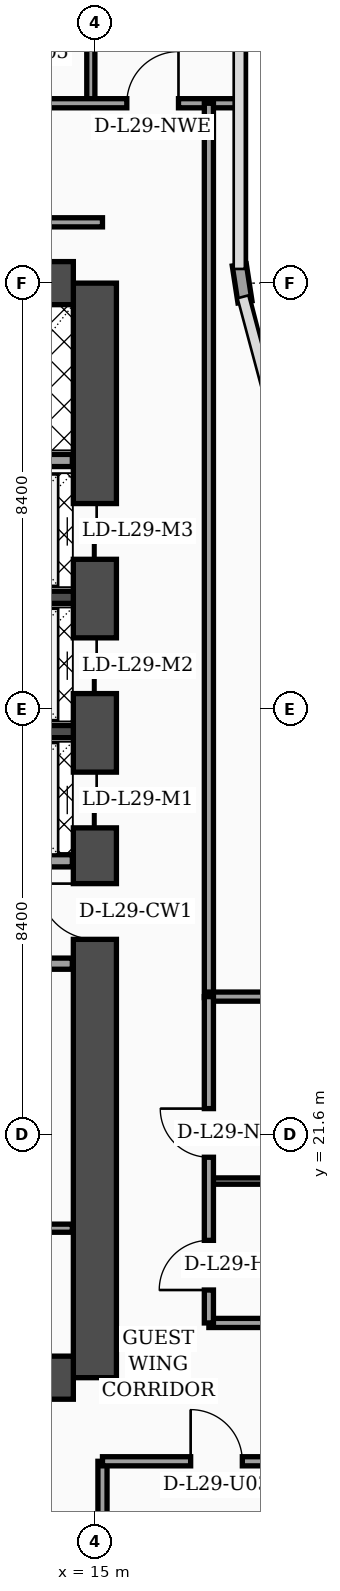
"""IFC4 building model, lengths in metres.
Left out: names, types, materials, properties, quantities, classifications, styles, units other than length and angle.
Written with IfcOpenShell. Run it as: python <this file> out.ifc"""

import sys

from ifc_helpers import new_model, si_unit, direction, frame, frame_2d, origin, place, context, subcontext, project, spatial, rectangle, extrude, element, fill, save


model = new_model("IFC4")
c1 = context("Model", 3, precision=1e-05, world=origin(), true_north=direction((0.0, 1.0)))
c2 = subcontext(c1, "Body", "Model", "MODEL_VIEW")
j1 = project(units=[si_unit("LENGTHUNIT", "METRE"), si_unit("PLANEANGLEUNIT", "RADIAN")], contexts=[c1])
p1 = place(None, origin())
s1 = spatial("IfcSite", under=j1, at=p1, CompositionType="ELEMENT")
p2 = place(p1, origin())
s2 = spatial("IfcBuilding", under=s1, at=p2, CompositionType="ELEMENT")
p3 = place(p2, frame((0.0, 0.0, 120.2)))
s3 = spatial("IfcBuildingStorey", under=s2, at=p3, CompositionType="ELEMENT", Elevation=120.2)
p4 = place(p3, frame((15.0, 16.8, 0.0), z_axis=(0.0, 0.0, 1.0), x_axis=(0.0, 1.0, 0.0)))
e1 = element("IfcWall", 1, at=p4, inside=s3, PredefinedType="SHEAR", context=c2, shape_type="SweptSolid", body=[
    extrude(rectangle(XDim=21.6, YDim=0.85, at=frame_2d((10.8, 0.0))), origin(), (0.0, 0.0, 1.0), 3.56),
])
p5 = place(p4, frame((8.65, 0.0, 0.0)))
e2 = element("IfcOpeningElement", 2, at=p5, cuts=e1, PredefinedType="OPENING", context=c2, shape_type="SweptSolid", body=[
    extrude(rectangle(XDim=1.1, YDim=2.2, at=frame_2d((0.55, 1.1))), frame((0.0, 0.435, 0.0), z_axis=(0.0, -1.0, 0.0), x_axis=(1.0, 0.0, 0.0)), (0.0, 0.0, 1.0), 0.87),
])
p6 = place(p4, frame((10.85, 0.0, 0.0)))
e3 = element("IfcOpeningElement", 3, at=p6, cuts=e1, PredefinedType="OPENING", context=c2, shape_type="SweptSolid", body=[
    extrude(rectangle(XDim=1.1, YDim=2.2, at=frame_2d((0.55, 1.1))), frame((0.0, 0.435, 0.0), z_axis=(0.0, -1.0, 0.0), x_axis=(1.0, 0.0, 0.0)), (0.0, 0.0, 1.0), 0.87),
])
p7 = place(p4, frame((13.5, 0.0, 0.0)))
e4 = element("IfcOpeningElement", 4, at=p7, cuts=e1, PredefinedType="OPENING", context=c2, shape_type="SweptSolid", body=[
    extrude(rectangle(XDim=1.1, YDim=2.2, at=frame_2d((0.55, 1.1))), frame((0.0, 0.435, 0.0), z_axis=(0.0, -1.0, 0.0), x_axis=(1.0, 0.0, 0.0)), (0.0, 0.0, 1.0), 0.87),
])
p8 = place(p4, frame((16.15, 0.0, 0.0)))
e5 = element("IfcOpeningElement", 5, at=p8, cuts=e1, PredefinedType="OPENING", context=c2, shape_type="SweptSolid", body=[
    extrude(rectangle(XDim=1.1, YDim=2.2, at=frame_2d((0.55, 1.1))), frame((0.0, 0.435, 0.0), z_axis=(0.0, -1.0, 0.0), x_axis=(1.0, 0.0, 0.0)), (0.0, 0.0, 1.0), 0.87),
])
for number, where, z_axis, x_axis in (
    (6, (4.625, 38.4, 0.0), (0.0, 0.0, 1.0), (1.0, 0.0, 0.0)),
    (7, (4.625, 16.8, 0.0), (0.0, 0.0, 1.0), (1.0, 0.0, 0.0)),
):
    element("IfcWall", number, at=place(p3, frame(where, z_axis=z_axis, x_axis=x_axis)), inside=s3, PredefinedType="SHEAR", context=c2, shape_type="SweptSolid", body=[
        extrude(rectangle(XDim=9.95, YDim=0.85, at=frame_2d((4.975, 0.0))), origin(), (0.0, 0.0, 1.0), 3.56),
    ])
for number, where, z_axis, x_axis in (
    (8, (12.18, 29.55, 0.0), (0.0, 0.0, 1.0), (1.0, 0.0, 0.0)),
    (9, (12.18, 32.2, 0.0), (0.0, 0.0, 1.0), (1.0, 0.0, 0.0)),
):
    element("IfcWall", number, at=place(p3, frame(where, z_axis=z_axis, x_axis=x_axis)), inside=s3, PredefinedType="SOLIDWALL", context=c2, shape_type="SweptSolid", body=[
        extrude(rectangle(XDim=2.395, YDim=0.24, at=frame_2d((1.198, 0.0))), origin(), (0.0, 0.0, 1.0), 3.56),
    ])
p9 = place(p3, frame((17.962, 38.03, 0.0), z_axis=(0.0, 0.0, 1.0), x_axis=(-0.15141125477, 0.988470855377, 0.0)))
e10 = element("IfcWall", 10, at=p9, inside=s3, PredefinedType="SOLIDWALL", context=c2, shape_type="SweptSolid", body=[
    extrude(rectangle(XDim=0.739, YDim=0.28, at=frame_2d((0.369, 0.0))), origin(), (0.0, 0.0, 1.0), 3.56),
])
p10 = place(p3, frame((9.68, 19.75, 0.0), z_axis=(0.0, 0.0, 1.0), x_axis=(1.0, 0.0, 0.0)))
e11 = element("IfcWall", 11, at=p10, inside=s3, PredefinedType="PARTITIONING", context=c2, shape_type="SweptSolid", body=[
    extrude(rectangle(XDim=4.875, YDim=0.16, at=frame_2d((2.438, 0.0))), origin(), (0.0, 0.0, 1.0), 3.56),
])
p11 = place(p10, frame((1.1, 0.0, 0.0)))
e12 = element("IfcOpeningElement", 12, at=p11, cuts=e11, PredefinedType="OPENING", context=c2, shape_type="SweptSolid", body=[
    extrude(rectangle(XDim=0.98, YDim=2.15, at=frame_2d((0.49, 1.075))), frame((0.0, 0.09, 0.0), z_axis=(0.0, -1.0, 0.0), x_axis=(1.0, 0.0, 0.0)), (0.0, 0.0, 1.0), 0.18),
])
p12 = place(p3, frame((9.68, 24.97, 0.0), z_axis=(0.0, 0.0, 1.0), x_axis=(1.0, 0.0, 0.0)))
e13 = element("IfcWall", 13, at=p12, inside=s3, PredefinedType="SOLIDWALL", context=c2, shape_type="SweptSolid", body=[
    extrude(rectangle(XDim=4.875, YDim=0.22, at=frame_2d((2.438, 0.0))), origin(), (0.0, 0.0, 1.0), 2.84),
])
p13 = place(p12, frame((0.9, 0.0, 0.0)))
e14 = element("IfcOpeningElement", 14, at=p13, cuts=e13, PredefinedType="OPENING", context=c2, shape_type="SweptSolid", body=[
    extrude(rectangle(XDim=0.98, YDim=2.15, at=frame_2d((0.49, 1.075))), frame((0.0, 0.12, 0.0), z_axis=(0.0, -1.0, 0.0), x_axis=(1.0, 0.0, 0.0)), (0.0, 0.0, 1.0), 0.24),
])
p14 = place(p3, frame((12.25, 27.0, 0.0), z_axis=(0.0, 0.0, 1.0), x_axis=(1.0, 0.0, 0.0)))
e15 = element("IfcWall", 15, at=p14, inside=s3, PredefinedType="SOLIDWALL", context=c2, shape_type="SweptSolid", body=[
    extrude(rectangle(XDim=2.305, YDim=0.24, at=frame_2d((1.152, 0.0))), origin(), (0.0, 0.0, 1.0), 3.56),
])
p15 = place(p3, frame((9.66, 34.9, 0.0), z_axis=(0.0, 0.0, 1.0), x_axis=(1.0, 0.0, 0.0)))
e16 = element("IfcWall", 16, at=p15, inside=s3, PredefinedType="SOLIDWALL", context=c2, shape_type="SweptSolid", body=[
    extrude(rectangle(XDim=4.895, YDim=0.24, at=frame_2d((2.448, 0.0))), origin(), (0.0, 0.0, 1.0), 3.56),
])
p16 = place(p3, frame((15.15, 2.44, 0.0), z_axis=(0.0, 0.0, 1.0), x_axis=(0.0, 1.0, 0.0)))
e17 = element("IfcWall", 17, at=p16, inside=s3, PredefinedType="PARTITIONING", context=c2, shape_type="SweptSolid", body=[
    extrude(rectangle(XDim=12.71, YDim=0.18, at=frame_2d((6.355, 0.0))), origin(), (0.0, 0.0, 1.0), 3.04),
])
p17 = place(p3, frame((15.15, 15.15, 0.0), z_axis=(0.0, 0.0, 1.0), x_axis=(1.0, 0.0, 0.0)))
e18 = element("IfcWall", 18, at=p17, inside=s3, PredefinedType="PARTITIONING", context=c2, shape_type="SweptSolid", body=[
    extrude(rectangle(XDim=6.45, YDim=0.18, at=frame_2d((3.225, 0.0))), origin(), (0.0, 0.0, 1.0), 2.49),
])
p18 = place(p17, frame((1.74, 0.0, 0.0)))
e19 = element("IfcOpeningElement", 19, at=p18, cuts=e18, PredefinedType="OPENING", context=c2, shape_type="SweptSolid", body=[
    extrude(rectangle(XDim=1.02, YDim=2.2, at=frame_2d((0.51, 1.1))), frame((0.0, 0.1, 0.0), z_axis=(0.0, -1.0, 0.0), x_axis=(1.0, 0.0, 0.0)), (0.0, 0.0, 1.0), 0.2),
])
p19 = place(p3, frame((14.92, 41.95, 0.0), z_axis=(0.0, 0.0, 1.0), x_axis=(0.0, 1.0, 0.0)))
e20 = element("IfcWall", 20, at=p19, inside=s3, PredefinedType="PARTITIONING", context=c2, shape_type="SweptSolid", body=[
    extrude(rectangle(XDim=5.85, YDim=0.16, at=frame_2d((2.925, 0.0))), origin(), (0.0, 0.0, 1.0), 3.04),
])
p20 = place(p3, frame((0.08, 41.95, 0.0), z_axis=(0.0, 0.0, 1.0), x_axis=(1.0, 0.0, 0.0)))
e21 = element("IfcWall", 21, at=p20, inside=s3, PredefinedType="PARTITIONING", context=c2, shape_type="SweptSolid", body=[
    extrude(rectangle(XDim=17.77, YDim=0.18, at=frame_2d((8.885, 0.0))), origin(), (0.0, 0.0, 1.0), 2.84),
])
p21 = place(p20, frame((0.9, 0.0, 0.0)))
e22 = element("IfcOpeningElement", 22, at=p21, cuts=e21, PredefinedType="OPENING", context=c2, shape_type="SweptSolid", body=[
    extrude(rectangle(XDim=1.02, YDim=2.2, at=frame_2d((0.51, 1.1))), frame((0.0, 0.1, 0.0), z_axis=(0.0, -1.0, 0.0), x_axis=(1.0, 0.0, 0.0)), (0.0, 0.0, 1.0), 0.2),
])
p22 = place(p20, frame((4.75, 0.0, 0.0)))
e23 = element("IfcOpeningElement", 23, at=p22, cuts=e21, PredefinedType="OPENING", context=c2, shape_type="SweptSolid", body=[
    extrude(rectangle(XDim=1.02, YDim=2.2, at=frame_2d((0.51, 1.1))), frame((0.0, 0.1, 0.0), z_axis=(0.0, -1.0, 0.0), x_axis=(1.0, 0.0, 0.0)), (0.0, 0.0, 1.0), 0.2),
])
p23 = place(p20, frame((10.63, 0.0, 0.0)))
e24 = element("IfcOpeningElement", 24, at=p23, cuts=e21, PredefinedType="OPENING", context=c2, shape_type="SweptSolid", body=[
    extrude(rectangle(XDim=1.02, YDim=2.2, at=frame_2d((0.51, 1.1))), frame((0.0, 0.1, 0.0), z_axis=(0.0, -1.0, 0.0), x_axis=(1.0, 0.0, 0.0)), (0.0, 0.0, 1.0), 0.2),
])
p24 = place(p20, frame((15.55, 0.0, 0.0)))
e25 = element("IfcOpeningElement", 25, at=p24, cuts=e21, PredefinedType="OPENING", context=c2, shape_type="SweptSolid", body=[
    extrude(rectangle(XDim=1.02, YDim=2.2, at=frame_2d((0.51, 1.1))), frame((0.0, 0.1, 0.0), z_axis=(0.0, -1.0, 0.0), x_axis=(1.0, 0.0, 0.0)), (0.0, 0.0, 1.0), 0.2),
])
p25 = place(p3, frame((17.25, 24.3, 0.0), z_axis=(0.0, 0.0, 1.0), x_axis=(0.0, 1.0, 0.0)))
e26 = element("IfcWall", 26, at=p25, inside=s3, PredefinedType="PARTITIONING", context=c2, shape_type="SweptSolid", body=[
    extrude(rectangle(XDim=17.65, YDim=0.18, at=frame_2d((8.825, 0.0))), origin(), (0.0, 0.0, 1.0), 2.84),
])
p26 = place(p3, frame((3.755, 39.6, 0.0), z_axis=(0.0, 0.0, 1.0), x_axis=(1.0, 0.0, 0.0)))
e27 = element("IfcWall", 27, at=p26, inside=s3, PredefinedType="PARTITIONING", context=c2, shape_type="SweptSolid", body=[
    extrude(rectangle(XDim=11.395, YDim=0.18, at=frame_2d((5.698, 0.0))), origin(), (0.0, 0.0, 1.0), 2.84),
])
p27 = place(p3, frame((17.25, 17.88, 0.0), z_axis=(0.0, 0.0, 1.0), x_axis=(1.0, 0.0, 0.0)))
e28 = element("IfcWall", 28, at=p27, inside=s3, PredefinedType="PARTITIONING", context=c2, shape_type="SweptSolid", body=[
    extrude(rectangle(XDim=4.3, YDim=0.18, at=frame_2d((2.15, 0.0))), origin(), (0.0, 0.0, 1.0), 3.56),
])
p28 = place(p3, frame((17.25, 20.68, 0.0), z_axis=(0.0, 0.0, 1.0), x_axis=(1.0, 0.0, 0.0)))
e29 = element("IfcWall", 29, at=p28, inside=s3, PredefinedType="PARTITIONING", context=c2, shape_type="SweptSolid", body=[
    extrude(rectangle(XDim=4.3, YDim=0.125, at=frame_2d((2.15, 0.0))), origin(), (0.0, 0.0, 1.0), 3.56),
])
p29 = place(p3, frame((17.25, 24.32, 0.0), z_axis=(0.0, 0.0, 1.0), x_axis=(1.0, 0.0, 0.0)))
e30 = element("IfcWall", 30, at=p29, inside=s3, PredefinedType="PARTITIONING", context=c2, shape_type="SweptSolid", body=[
    extrude(rectangle(XDim=4.35, YDim=0.18, at=frame_2d((2.175, 0.0))), origin(), (0.0, 0.0, 1.0), 3.56),
])
p30 = place(p3, frame((17.25, 17.88, 0.0), z_axis=(0.0, 0.0, 1.0), x_axis=(0.0, 1.0, 0.0)))
e31 = element("IfcWall", 31, at=p30, inside=s3, PredefinedType="PARTITIONING", context=c2, shape_type="SweptSolid", body=[
    extrude(rectangle(XDim=6.44, YDim=0.18, at=frame_2d((3.22, 0.0))), origin(), (0.0, 0.0, 1.0), 3.56),
])
p31 = place(p30, frame((0.65, 0.0, 0.0)))
e32 = element("IfcOpeningElement", 32, at=p31, cuts=e31, PredefinedType="OPENING", context=c2, shape_type="SweptSolid", body=[
    extrude(rectangle(XDim=0.98, YDim=2.15, at=frame_2d((0.49, 1.075))), frame((0.0, 0.1, 0.0), z_axis=(0.0, -1.0, 0.0), x_axis=(1.0, 0.0, 0.0)), (0.0, 0.0, 1.0), 0.2),
])
p32 = place(p30, frame((3.27, 0.0, 0.0)))
e33 = element("IfcOpeningElement", 33, at=p32, cuts=e31, PredefinedType="OPENING", context=c2, shape_type="SweptSolid", body=[
    extrude(rectangle(XDim=0.96, YDim=2.2, at=frame_2d((0.48, 1.1))), frame((0.0, 0.1, 0.0), z_axis=(0.0, -1.0, 0.0), x_axis=(1.0, 0.0, 0.0)), (0.0, 0.0, 1.0), 0.2),
])
p33 = place(p18, origin())
e34 = element("IfcDoor", 34, at=p33, inside=s3, OperationType="SINGLE_SWING_LEFT", PredefinedType="DOOR", context=c2, shape_type="SweptSolid", body=[
    extrude(rectangle(XDim=1.02, YDim=2.2, at=frame_2d((0.51, 1.1))), frame((0.0, 0.025, 0.0), z_axis=(0.0, -1.0, 0.0), x_axis=(1.0, 0.0, 0.0)), (0.0, 0.0, 1.0), 0.05),
])
fill(e19, e34)
p34 = place(p24, origin())
e35 = element("IfcDoor", 35, at=p34, inside=s3, OperationType="SINGLE_SWING_RIGHT", PredefinedType="DOOR", context=c2, shape_type="SweptSolid", body=[
    extrude(rectangle(XDim=1.02, YDim=2.2, at=frame_2d((0.51, 1.1))), frame((0.0, 0.025, 0.0), z_axis=(0.0, -1.0, 0.0), x_axis=(1.0, 0.0, 0.0)), (0.0, 0.0, 1.0), 0.05),
])
fill(e25, e35)
p35 = place(p31, origin())
e36 = element("IfcDoor", 36, at=p35, inside=s3, OperationType="SINGLE_SWING_LEFT", PredefinedType="DOOR", context=c2, shape_type="SweptSolid", body=[
    extrude(rectangle(XDim=0.98, YDim=2.15, at=frame_2d((0.49, 1.075))), frame((0.0, 0.025, 0.0), z_axis=(0.0, -1.0, 0.0), x_axis=(1.0, 0.0, 0.0)), (0.0, 0.0, 1.0), 0.05),
])
fill(e32, e36)
p36 = place(p32, origin())
e37 = element("IfcDoor", 37, at=p36, inside=s3, OperationType="SINGLE_SWING_RIGHT", PredefinedType="DOOR", context=c2, shape_type="SweptSolid", body=[
    extrude(rectangle(XDim=0.96, YDim=2.2, at=frame_2d((0.48, 1.1))), frame((0.0, 0.025, 0.0), z_axis=(0.0, -1.0, 0.0), x_axis=(1.0, 0.0, 0.0)), (0.0, 0.0, 1.0), 0.05),
])
fill(e33, e37)
p37 = place(p5, origin())
e38 = element("IfcDoor", 38, at=p37, inside=s3, OperationType="SINGLE_SWING_RIGHT", PredefinedType="DOOR", context=c2, shape_type="SweptSolid", body=[
    extrude(rectangle(XDim=1.1, YDim=2.2, at=frame_2d((0.55, 1.1))), frame((0.0, 0.025, 0.0), z_axis=(0.0, -1.0, 0.0), x_axis=(1.0, 0.0, 0.0)), (0.0, 0.0, 1.0), 0.05),
])
fill(e2, e38)
p38 = place(p6, origin())
e39 = element("IfcDoor", 39, at=p38, inside=s3, OperationType="DOUBLE_DOOR_SLIDING", PredefinedType="DOOR", context=c2, shape_type="SweptSolid", body=[
    extrude(rectangle(XDim=1.1, YDim=2.2, at=frame_2d((0.55, 1.1))), frame((0.0, 0.025, 0.0), z_axis=(0.0, -1.0, 0.0), x_axis=(1.0, 0.0, 0.0)), (0.0, 0.0, 1.0), 0.05),
])
fill(e3, e39)
p39 = place(p7, origin())
e40 = element("IfcDoor", 40, at=p39, inside=s3, OperationType="DOUBLE_DOOR_SLIDING", PredefinedType="DOOR", context=c2, shape_type="SweptSolid", body=[
    extrude(rectangle(XDim=1.1, YDim=2.2, at=frame_2d((0.55, 1.1))), frame((0.0, 0.025, 0.0), z_axis=(0.0, -1.0, 0.0), x_axis=(1.0, 0.0, 0.0)), (0.0, 0.0, 1.0), 0.05),
])
fill(e4, e40)
p40 = place(p8, origin())
e41 = element("IfcDoor", 41, at=p40, inside=s3, OperationType="DOUBLE_DOOR_SLIDING", PredefinedType="DOOR", context=c2, shape_type="SweptSolid", body=[
    extrude(rectangle(XDim=1.1, YDim=2.2, at=frame_2d((0.55, 1.1))), frame((0.0, 0.025, 0.0), z_axis=(0.0, -1.0, 0.0), x_axis=(1.0, 0.0, 0.0)), (0.0, 0.0, 1.0), 0.05),
])
fill(e5, e41)
save(model, sys.argv[1])
